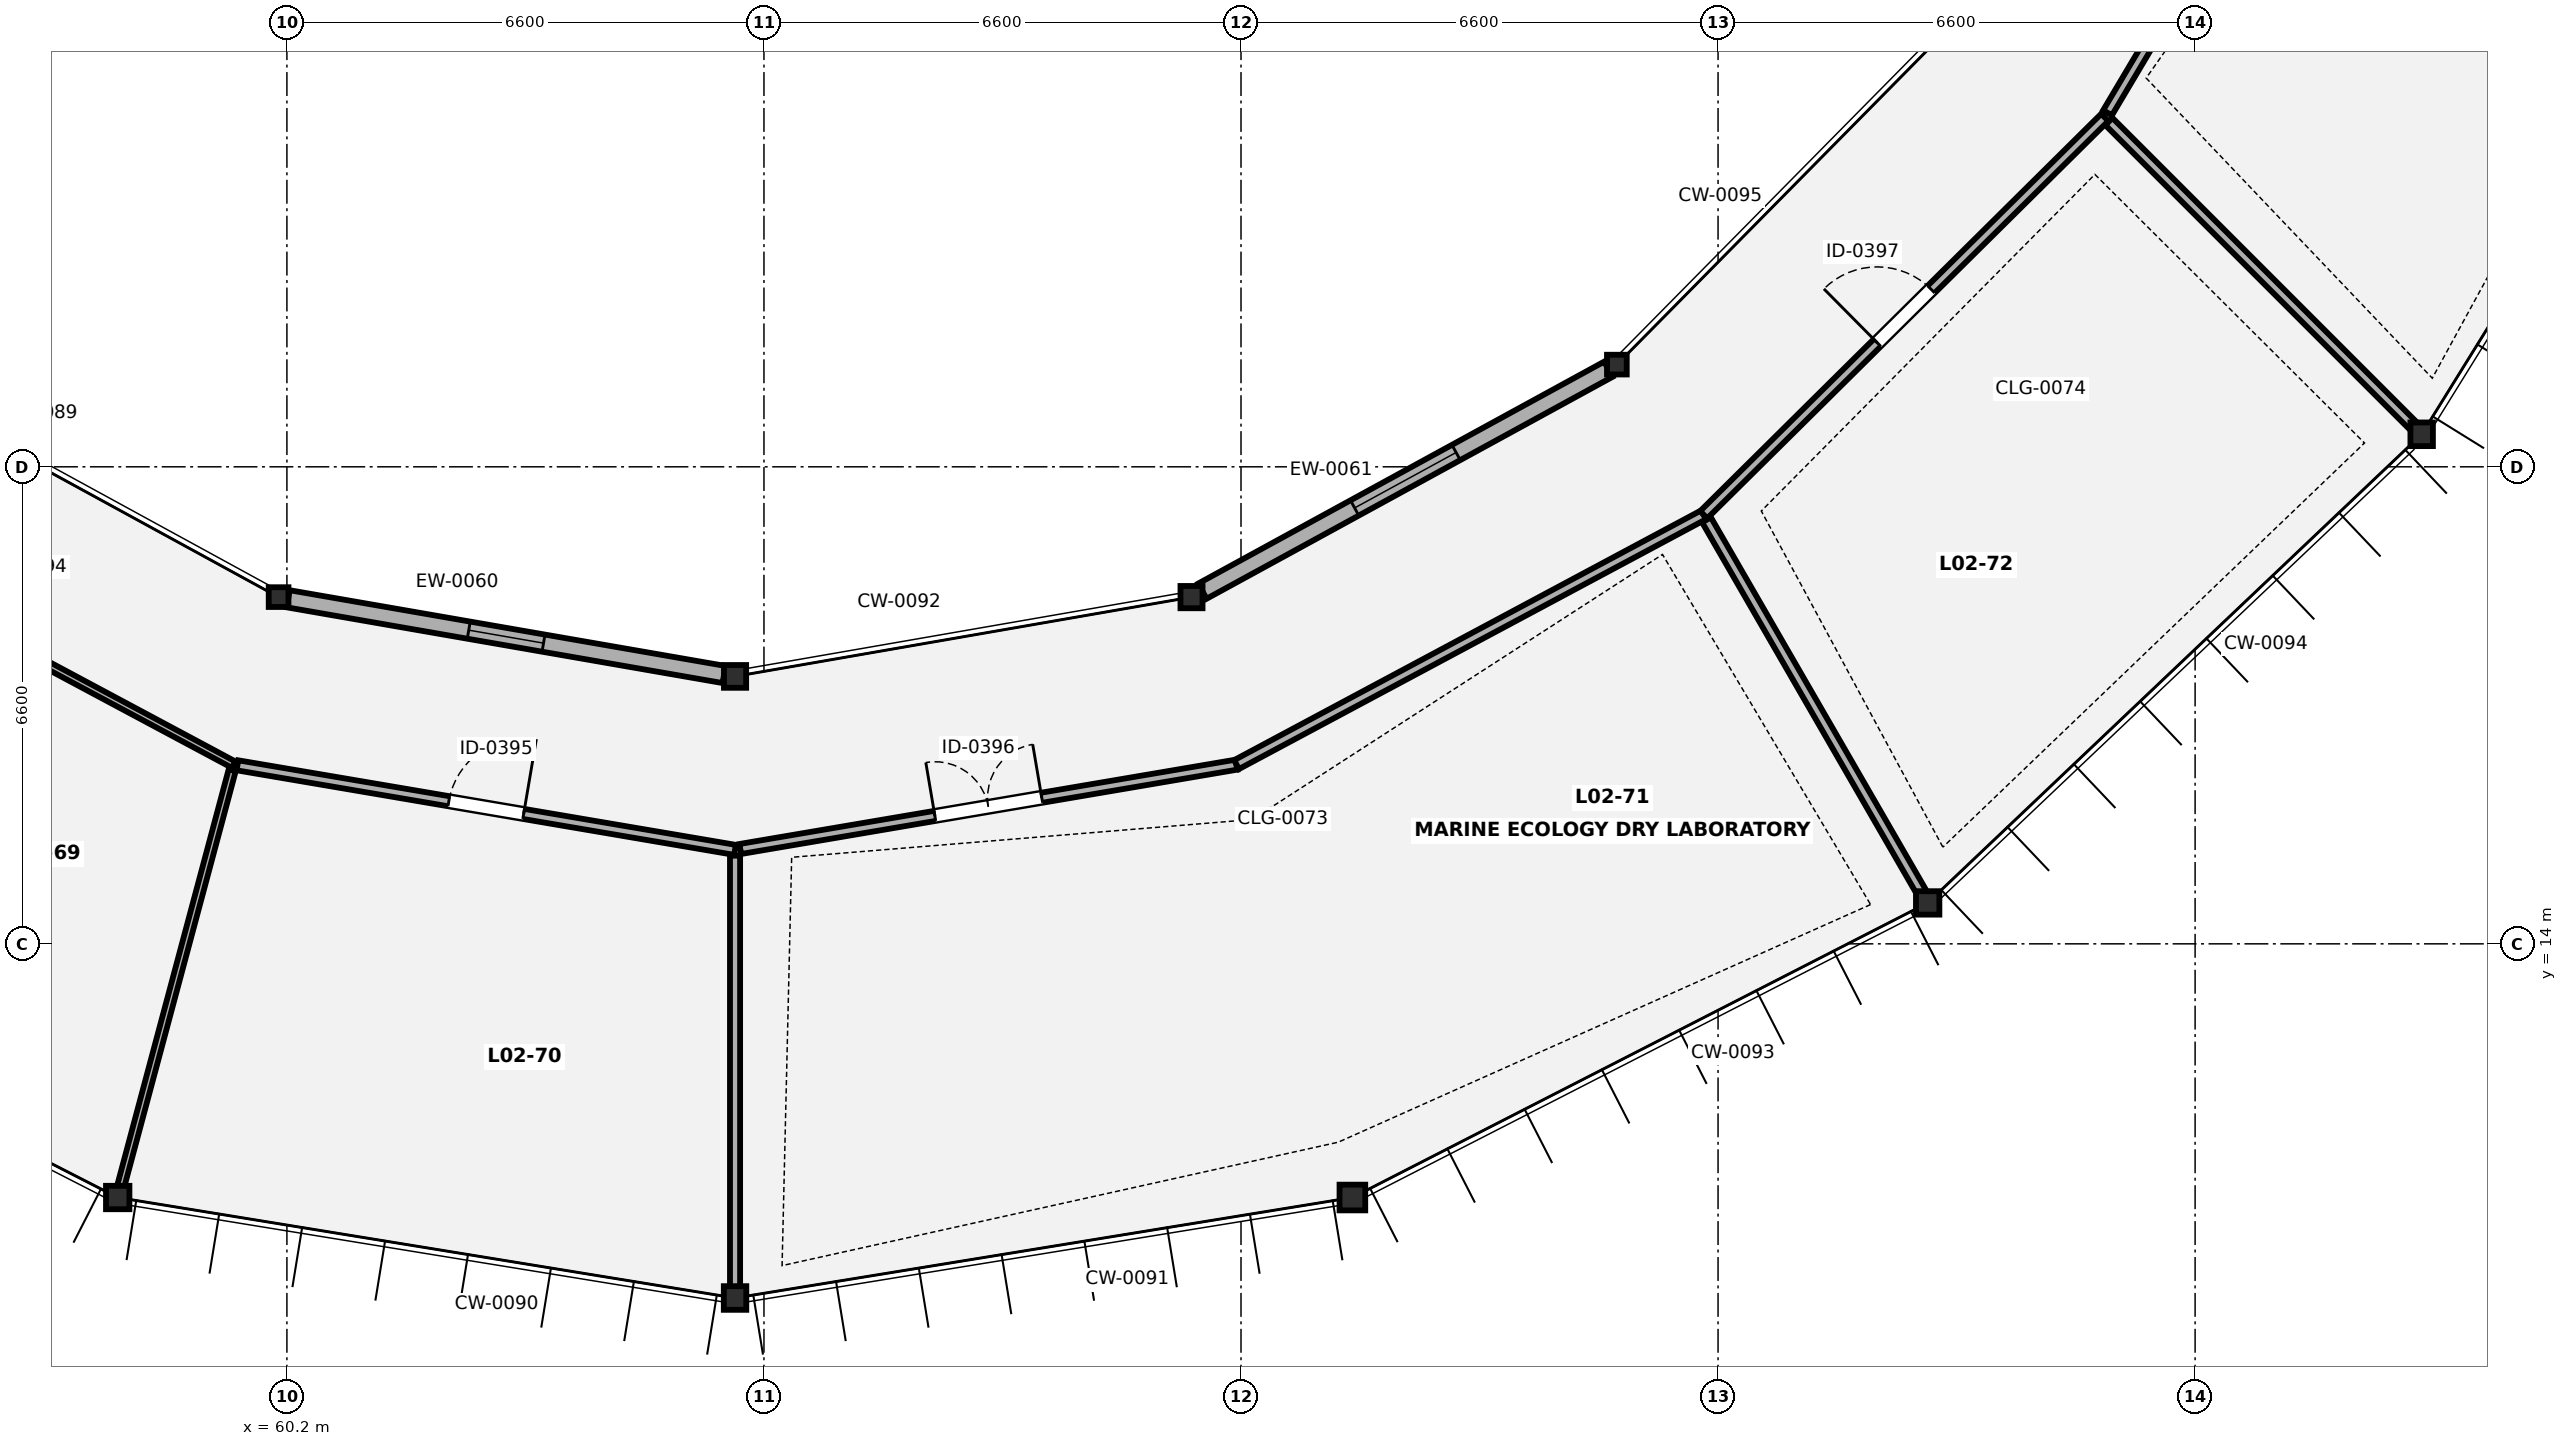
"""IFC4 building model, lengths in metres.
Left out: names, types, materials, properties, quantities, classifications, styles, units other than length and angle.
Written with IfcOpenShell. Run it as: python <this file> out.ifc"""

import sys

from ifc_helpers import new_model, si_unit, direction, frame, frame_2d, origin, origin_2d, place, context, subcontext, project, spatial, rectangle, hollow_circle, i_section, extrude, element, fill, save


model = new_model("IFC4")
c1 = context("Model", 3, precision=1e-05, world=origin(), true_north=direction((0.0, 1.0)))
c2 = subcontext(c1, "Body", "Model", "MODEL_VIEW")
j1 = project(units=[si_unit("LENGTHUNIT", "METRE"), si_unit("PLANEANGLEUNIT", "RADIAN")], contexts=[c1])
p1 = place(None, origin())
s1 = spatial("IfcSite", under=j1, at=p1, CompositionType="ELEMENT")
p2 = place(p1, origin())
s2 = spatial("IfcBuilding", under=s1, at=p2, CompositionType="ELEMENT")
p3 = place(p2, frame((0.0, 0.0, 9.1)))
s3 = spatial("IfcBuildingStorey", under=s2, at=p3, CompositionType="ELEMENT", Elevation=9.1)
p4 = place(p3, frame((57.859, 10.49, 0.0), z_axis=(0.0, 0.0, 1.0), x_axis=(1.0, 0.0, 0.0)))
e1 = element("IfcColumn", 1, at=p4, inside=s3, PredefinedType="COLUMN", context=c2, shape_type="SweptSolid", body=[
    extrude(hollow_circle(Radius=0.162, WallThickness=0.013, at=origin_2d()), origin(), (0.0, 0.0, 1.0), 4.2),
])
p5 = place(p3, frame((60.085, 18.797, 0.0), z_axis=(0.0, 0.0, 1.0), x_axis=(1.0, 0.0, 0.0)))
e2 = element("IfcColumn", 2, at=p5, inside=s3, PredefinedType="COLUMN", context=c2, shape_type="SweptSolid", body=[
    extrude(hollow_circle(Radius=0.136, WallThickness=0.009, at=origin_2d()), origin(), (0.0, 0.0, 1.0), 4.2),
])
p6 = place(p3, frame((66.4, 9.1, 0.0), z_axis=(0.0, 0.0, 1.0), x_axis=(1.0, 0.0, 0.0)))
e3 = element("IfcColumn", 3, at=p6, inside=s3, PredefinedType="COLUMN", context=c2, shape_type="SweptSolid", body=[
    extrude(i_section(OverallWidth=0.311, OverallDepth=0.327, WebThickness=0.016, FlangeThickness=0.025, FilletRadius=0.017, at=origin_2d()), origin(), (0.0, 0.0, 1.0), 4.2),
])
p7 = place(p3, frame((66.4, 17.7, 0.0), z_axis=(0.0, 0.0, 1.0), x_axis=(1.0, 0.0, 0.0)))
e4 = element("IfcColumn", 4, at=p7, inside=s3, PredefinedType="COLUMN", context=c2, shape_type="SweptSolid", body=[
    extrude(i_section(OverallWidth=0.307, OverallDepth=0.315, WebThickness=0.012, FlangeThickness=0.019, FilletRadius=0.017, at=origin_2d()), origin(), (0.0, 0.0, 1.0), 4.2),
])
p8 = place(p3, frame((74.941, 10.49, 0.0), z_axis=(0.0, 0.0, 1.0), x_axis=(1.0, 0.0, 0.0)))
e5 = element("IfcColumn", 5, at=p8, inside=s3, PredefinedType="COLUMN", context=c2, shape_type="SweptSolid", body=[
    extrude(hollow_circle(Radius=0.178, WallThickness=0.013, at=origin_2d()), origin(), (0.0, 0.0, 1.0), 4.2),
])
p9 = place(p3, frame((72.715, 18.797, 0.0), z_axis=(0.0, 0.0, 1.0), x_axis=(1.0, 0.0, 0.0)))
e6 = element("IfcColumn", 6, at=p9, inside=s3, PredefinedType="COLUMN", context=c2, shape_type="SweptSolid", body=[
    extrude(i_section(OverallWidth=0.305, OverallDepth=0.308, WebThickness=0.01, FlangeThickness=0.015, FilletRadius=0.017, at=origin_2d()), origin(), (0.0, 0.0, 1.0), 4.2),
])
p10 = place(p3, frame((82.9, 14.566, 0.0), z_axis=(0.0, 0.0, 1.0), x_axis=(1.0, 0.0, 0.0)))
e7 = element("IfcColumn", 7, at=p10, inside=s3, PredefinedType="COLUMN", context=c2, shape_type="SweptSolid", body=[
    extrude(hollow_circle(Radius=0.162, WallThickness=0.013, at=origin_2d()), origin(), (0.0, 0.0, 1.0), 4.2),
])
p11 = place(p3, frame((78.6, 22.014, 0.0), z_axis=(0.0, 0.0, 1.0), x_axis=(1.0, 0.0, 0.0)))
e8 = element("IfcColumn", 8, at=p11, inside=s3, PredefinedType="COLUMN", context=c2, shape_type="SweptSolid", body=[
    extrude(hollow_circle(Radius=0.136, WallThickness=0.009, at=origin_2d()), origin(), (0.0, 0.0, 1.0), 4.2),
])
p12 = place(p3, frame((89.735, 21.05, 0.0), z_axis=(0.0, 0.0, 1.0), x_axis=(1.0, 0.0, 0.0)))
e9 = element("IfcColumn", 9, at=p12, inside=s3, PredefinedType="COLUMN", context=c2, shape_type="SweptSolid", body=[
    extrude(i_section(OverallWidth=0.311, OverallDepth=0.327, WebThickness=0.016, FlangeThickness=0.025, FilletRadius=0.017, at=origin_2d()), origin(), (0.0, 0.0, 1.0), 4.2),
])
p13 = place(p3, frame((60.217, 18.774, 0.0), z_axis=(0.0, 0.0, 1.0), x_axis=(0.985241011519, -0.171172863562, 0.0)))
e10 = element("IfcWall", 10, at=p13, inside=s3, PredefinedType="SOLIDWALL", context=c2, shape_type="SweptSolid", body=[
    extrude(rectangle(XDim=6.122, YDim=0.24, at=frame_2d((3.061, 0.0))), origin(), (0.0, 0.0, 1.0), 3.65),
])
p14 = place(p13, frame((2.536, 0.0, 0.85)))
e11 = element("IfcOpeningElement", 11, at=p14, cuts=e10, PredefinedType="OPENING", context=c2, shape_type="SweptSolid", body=[
    extrude(rectangle(XDim=1.05, YDim=1.35, at=frame_2d((0.525, 0.675))), frame((0.0, 0.13, 0.0), z_axis=(0.0, -1.0, 0.0), x_axis=(1.0, 0.0, 0.0)), (0.0, 0.0, 1.0), 0.26),
])
p15 = place(p3, frame((72.866, 18.88, 0.0), z_axis=(0.0, 0.0, 1.0), x_axis=(0.877463709328, 0.479643032695, 0.0)))
e12 = element("IfcWall", 12, at=p15, inside=s3, PredefinedType="SOLIDWALL", context=c2, shape_type="SweptSolid", body=[
    extrude(rectangle(XDim=6.4, YDim=0.24, at=frame_2d((3.2, 0.0))), origin(), (0.0, 0.0, 1.0), 3.65),
])
p16 = place(p15, frame((2.4, 0.0, 0.85)))
e13 = element("IfcOpeningElement", 13, at=p16, cuts=e12, PredefinedType="OPENING", context=c2, shape_type="SweptSolid", body=[
    extrude(rectangle(XDim=1.6, YDim=1.5, at=frame_2d((0.8, 0.75))), frame((0.0, 0.13, 0.0), z_axis=(0.0, -1.0, 0.0), x_axis=(1.0, 0.0, 0.0)), (0.0, 0.0, 1.0), 0.26),
])
p17 = place(p3, frame((53.063, 19.902, 0.0), z_axis=(0.0, 0.0, 1.0), x_axis=(0.881826283139, -0.471574391125, 0.0)))
e14 = element("IfcWall", 14, at=p17, inside=s3, PredefinedType="PARTITIONING", context=c2, shape_type="SweptSolid", body=[
    extrude(rectangle(XDim=7.258, YDim=0.1, at=frame_2d((3.629, 0.0))), origin(), (0.0, 0.0, 1.0), 4.0),
])
p18 = place(p17, frame((3.129, 0.0, 0.0)))
e15 = element("IfcOpeningElement", 15, at=p18, cuts=e14, PredefinedType="OPENING", context=c2, shape_type="SweptSolid", body=[
    extrude(rectangle(XDim=1.0, YDim=2.1, at=frame_2d((0.5, 1.05))), frame((0.0, 0.06, 0.0), z_axis=(0.0, -1.0, 0.0), x_axis=(1.0, 0.0, 0.0)), (0.0, 0.0, 1.0), 0.12),
])
p19 = place(p3, frame((59.443, 16.402, 0.0), z_axis=(0.0, 0.0, 1.0), x_axis=(-0.258805895167, -0.965929349708, 0.0)))
e16 = element("IfcWall", 16, at=p19, inside=s3, PredefinedType="PARTITIONING", context=c2, shape_type="SweptSolid", body=[
    extrude(rectangle(XDim=6.06, YDim=0.1, at=frame_2d((3.03, 0.0))), origin(), (0.0, 0.0, 1.0), 3.323),
])
p20 = place(p3, frame((59.515, 16.47, 0.0), z_axis=(0.0, 0.0, 1.0), x_axis=(0.985861622289, -0.167561516157, 0.0)))
e17 = element("IfcWall", 17, at=p20, inside=s3, PredefinedType="PARTITIONING", context=c2, shape_type="SweptSolid", body=[
    extrude(rectangle(XDim=6.983, YDim=0.14, at=frame_2d((3.492, 0.0))), origin(), (0.0, 0.0, 1.0), 4.0),
])
p21 = place(p20, frame((2.967, 0.0, 0.0)))
e18 = element("IfcOpeningElement", 18, at=p21, cuts=e17, PredefinedType="OPENING", context=c2, shape_type="SweptSolid", body=[
    extrude(rectangle(XDim=1.05, YDim=2.15, at=frame_2d((0.525, 1.075))), frame((0.0, 0.08, 0.0), z_axis=(0.0, -1.0, 0.0), x_axis=(1.0, 0.0, 0.0)), (0.0, 0.0, 1.0), 0.16),
])
p22 = place(p3, frame((66.4, 15.22, 0.0), z_axis=(0.0, 0.0, 1.0), x_axis=(0.0, -1.0, 0.0)))
e19 = element("IfcWall", 19, at=p22, inside=s3, PredefinedType="PARTITIONING", context=c2, shape_type="SweptSolid", body=[
    extrude(rectangle(XDim=6.06, YDim=0.14, at=frame_2d((3.03, 0.0))), origin(), (0.0, 0.0, 1.0), 3.392),
])
p23 = place(p3, frame((66.472, 15.312, 0.0), z_axis=(0.0, 0.0, 1.0), x_axis=(0.985861002198, 0.167565164474, 0.0)))
e20 = element("IfcWall", 20, at=p23, inside=s3, PredefinedType="PARTITIONING", context=c2, shape_type="SweptSolid", body=[
    extrude(rectangle(XDim=6.963, YDim=0.14, at=frame_2d((3.481, 0.0))), origin(), (0.0, 0.0, 1.0), 4.0),
])
p24 = place(p23, frame((2.731, 0.0, 0.0)))
e21 = element("IfcOpeningElement", 21, at=p24, cuts=e20, PredefinedType="OPENING", context=c2, shape_type="SweptSolid", body=[
    extrude(rectangle(XDim=1.5, YDim=2.15, at=frame_2d((0.75, 1.075))), frame((0.0, 0.08, 0.0), z_axis=(0.0, -1.0, 0.0), x_axis=(1.0, 0.0, 0.0)), (0.0, 0.0, 1.0), 0.16),
])
p25 = place(p3, frame((73.338, 16.48, 0.0), z_axis=(0.0, 0.0, 1.0), x_axis=(0.881830395915, 0.471566700309, 0.0)))
e22 = element("IfcWall", 22, at=p25, inside=s3, PredefinedType="PARTITIONING", context=c2, shape_type="SweptSolid", body=[
    extrude(rectangle(XDim=7.328, YDim=0.14, at=frame_2d((3.664, 0.0))), origin(), (0.0, 0.0, 1.0), 4.0),
])
p26 = place(p3, frame((79.84, 19.866, 0.0), z_axis=(0.0, 0.0, 1.0), x_axis=(0.500008418462, -0.866020543329, 0.0)))
e23 = element("IfcWall", 23, at=p26, inside=s3, PredefinedType="PARTITIONING", context=c2, shape_type="SweptSolid", body=[
    extrude(rectangle(XDim=6.06, YDim=0.14, at=frame_2d((3.03, 0.0))), origin(), (0.0, 0.0, 1.0), 3.313),
])
p27 = place(p3, frame((79.802, 19.937, 0.0), z_axis=(0.0, 0.0, 1.0), x_axis=(0.710427757183, 0.703770134222, 0.0)))
e24 = element("IfcWall", 24, at=p27, inside=s3, PredefinedType="PARTITIONING", context=c2, shape_type="SweptSolid", body=[
    extrude(rectangle(XDim=7.811, YDim=0.14, at=frame_2d((3.905, 0.0))), origin(), (0.0, 0.0, 1.0), 4.0),
])
p28 = place(p27, frame((3.381, 0.0, 0.0)))
e25 = element("IfcOpeningElement", 25, at=p28, cuts=e24, PredefinedType="OPENING", context=c2, shape_type="SweptSolid", body=[
    extrude(rectangle(XDim=1.05, YDim=2.15, at=frame_2d((0.525, 1.075))), frame((0.0, 0.08, 0.0), z_axis=(0.0, -1.0, 0.0), x_axis=(1.0, 0.0, 0.0)), (0.0, 0.0, 1.0), 0.16),
])
p29 = place(p3, frame((85.407, 25.377, 0.0), z_axis=(0.0, 0.0, 1.0), x_axis=(0.707106781187, -0.707106781187, 0.0)))
e26 = element("IfcWall", 26, at=p29, inside=s3, PredefinedType="PARTITIONING", context=c2, shape_type="SweptSolid", body=[
    extrude(rectangle(XDim=6.06, YDim=0.14, at=frame_2d((3.03, 0.0))), origin(), (0.0, 0.0, 1.0), 3.323),
])
p30 = place(p3, frame((85.388, 25.498, 0.0), z_axis=(0.0, 0.0, 1.0), x_axis=(0.510914893672, 0.8596312997, 0.0)))
e27 = element("IfcWall", 27, at=p30, inside=s3, PredefinedType="PARTITIONING", context=c2, shape_type="SweptSolid", body=[
    extrude(rectangle(XDim=8.262, YDim=0.14, at=frame_2d((4.131, 0.0))), origin(), (0.0, 0.0, 1.0), 4.0),
])
p31 = place(p30, frame((3.381, 0.0, 0.0)))
e28 = element("IfcOpeningElement", 28, at=p31, cuts=e27, PredefinedType="OPENING", context=c2, shape_type="SweptSolid", body=[
    extrude(rectangle(XDim=1.5, YDim=2.15, at=frame_2d((0.75, 1.075))), frame((0.0, 0.08, 0.0), z_axis=(0.0, -1.0, 0.0), x_axis=(1.0, 0.0, 0.0)), (0.0, 0.0, 1.0), 0.16),
])
p32 = place(p14, origin())
e29 = element("IfcWindow", 29, at=p32, inside=s3, PartitioningType="SINGLE_PANEL", PredefinedType="WINDOW", context=c2, shape_type="SweptSolid", body=[
    extrude(rectangle(XDim=1.05, YDim=1.35, at=frame_2d((0.525, 0.675))), frame((0.0, 0.03, 0.0), z_axis=(0.0, -1.0, 0.0), x_axis=(1.0, 0.0, 0.0)), (0.0, 0.0, 1.0), 0.06),
])
fill(e11, e29)
p33 = place(p16, origin())
e30 = element("IfcWindow", 30, at=p33, inside=s3, PartitioningType="SINGLE_PANEL", PredefinedType="WINDOW", context=c2, shape_type="SweptSolid", body=[
    extrude(rectangle(XDim=1.6, YDim=1.5, at=frame_2d((0.8, 0.75))), frame((0.0, 0.03, 0.0), z_axis=(0.0, -1.0, 0.0), x_axis=(1.0, 0.0, 0.0)), (0.0, 0.0, 1.0), 0.06),
])
fill(e13, e30)
p34 = place(p21, origin())
e31 = element("IfcDoor", 31, at=p34, inside=s3, OperationType="SINGLE_SWING_RIGHT", PredefinedType="DOOR", context=c2, shape_type="SweptSolid", body=[
    extrude(rectangle(XDim=1.05, YDim=2.15, at=frame_2d((0.525, 1.075))), frame((0.0, 0.025, 0.0), z_axis=(0.0, -1.0, 0.0), x_axis=(1.0, 0.0, 0.0)), (0.0, 0.0, 1.0), 0.05),
])
fill(e18, e31)
p35 = place(p24, origin())
e32 = element("IfcDoor", 32, at=p35, inside=s3, OperationType="DOUBLE_DOOR_SINGLE_SWING", PredefinedType="DOOR", context=c2, shape_type="SweptSolid", body=[
    extrude(rectangle(XDim=1.5, YDim=2.15, at=frame_2d((0.75, 1.075))), frame((0.0, 0.025, 0.0), z_axis=(0.0, -1.0, 0.0), x_axis=(1.0, 0.0, 0.0)), (0.0, 0.0, 1.0), 0.05),
])
fill(e21, e32)
p36 = place(p28, origin())
e33 = element("IfcDoor", 33, at=p36, inside=s3, OperationType="SINGLE_SWING_LEFT", PredefinedType="DOOR", context=c2, shape_type="SweptSolid", body=[
    extrude(rectangle(XDim=1.05, YDim=2.15, at=frame_2d((0.525, 1.075))), frame((0.0, 0.025, 0.0), z_axis=(0.0, -1.0, 0.0), x_axis=(1.0, 0.0, 0.0)), (0.0, 0.0, 1.0), 0.05),
])
fill(e25, e33)
save(model, sys.argv[1])
